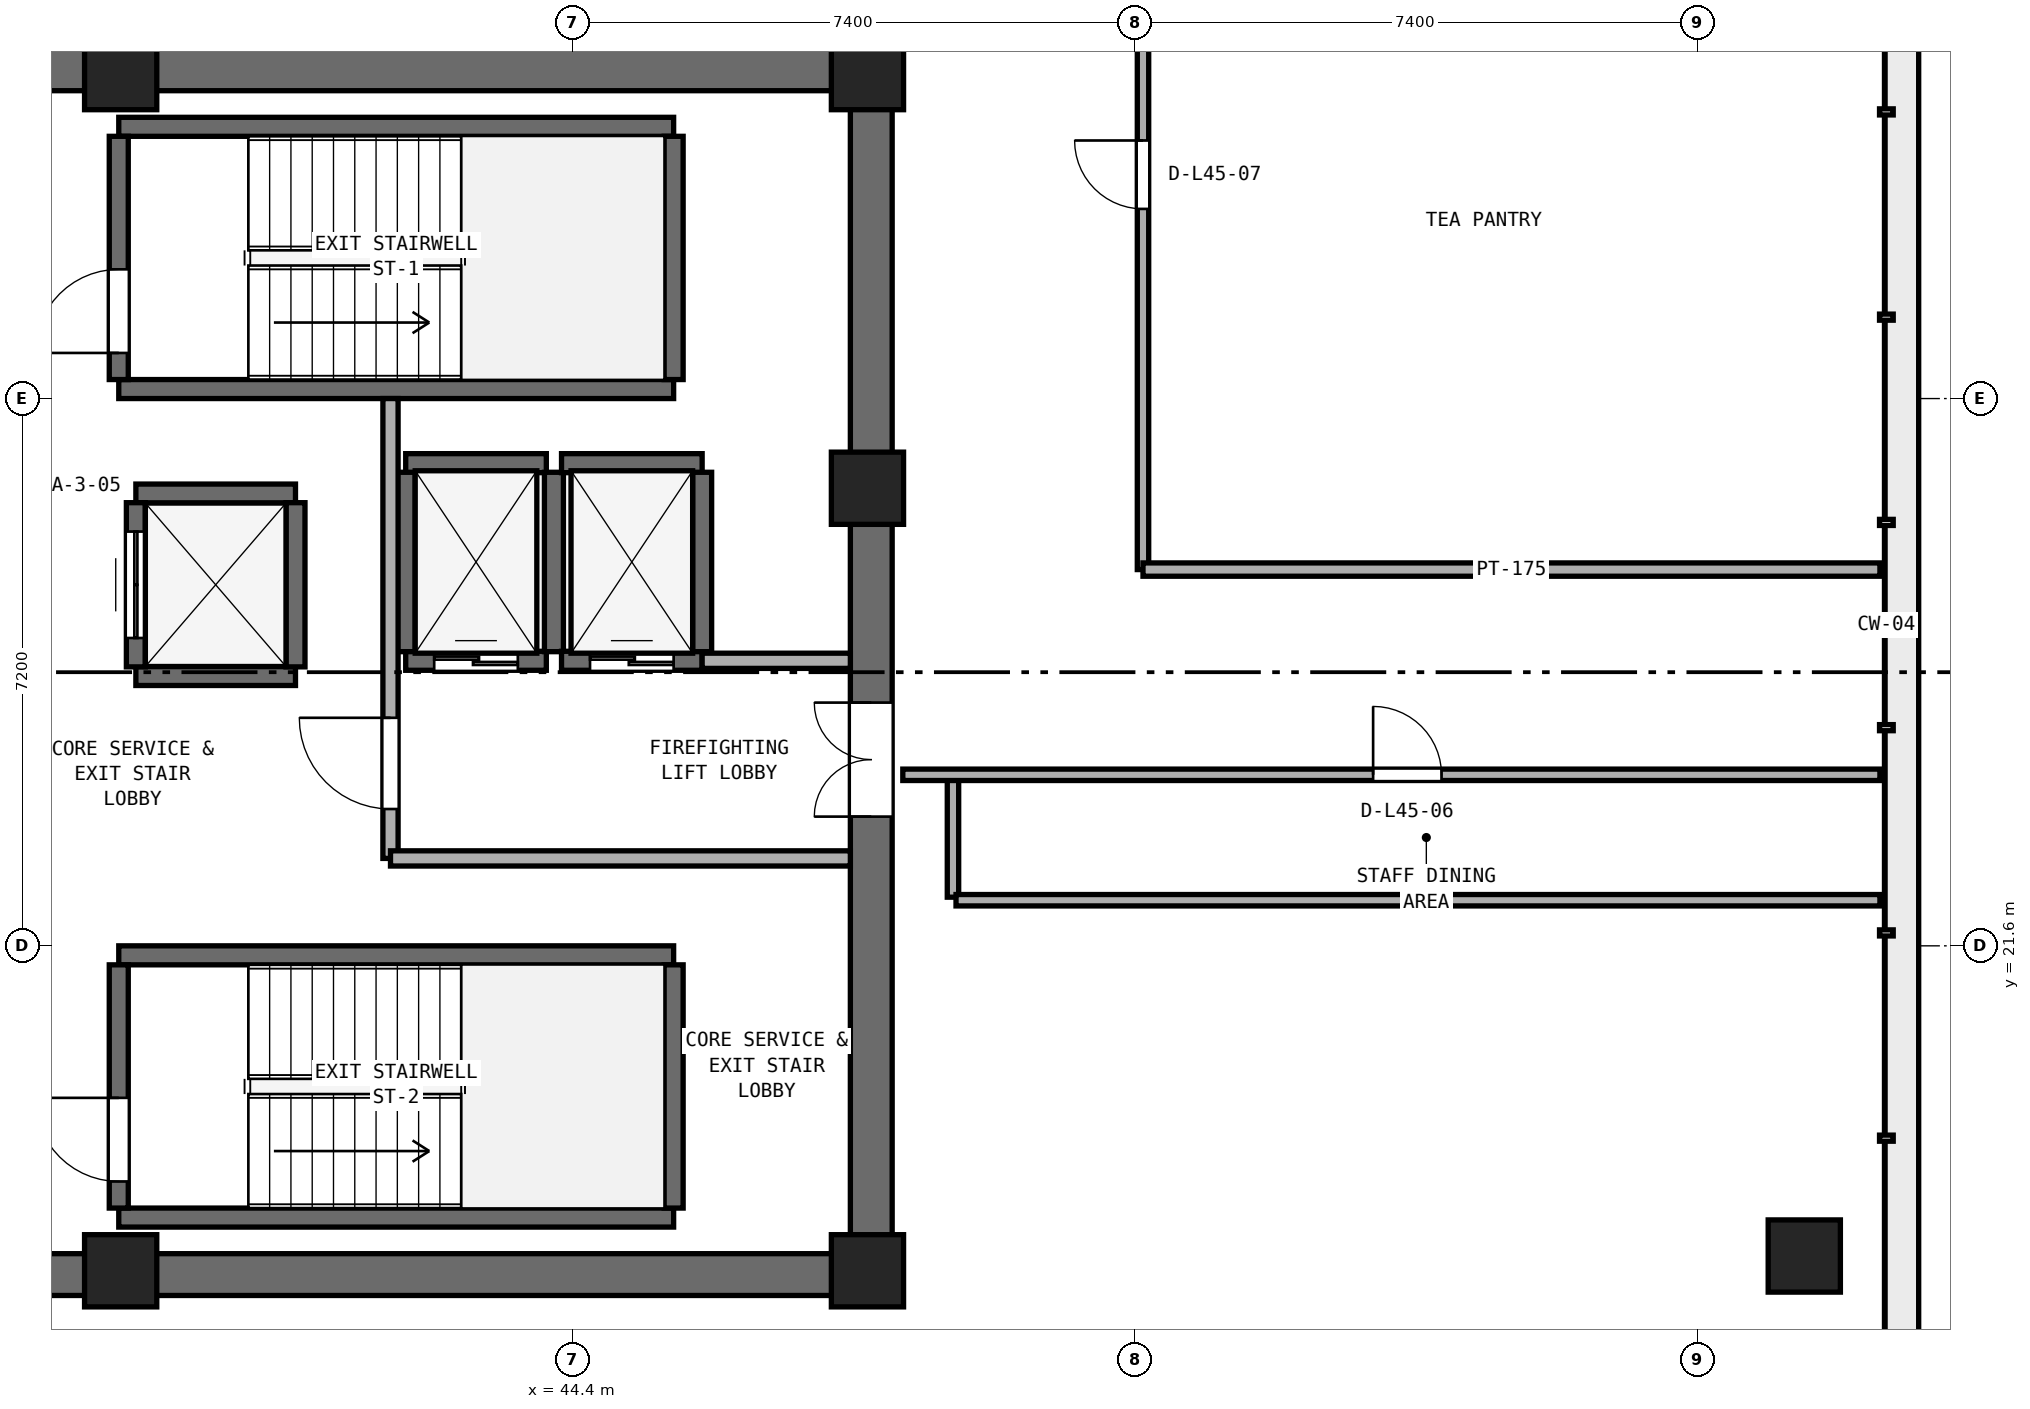
"""IFC4 building model, lengths in metres.
Left out: names, types, materials, properties, quantities, classifications, styles, units other than length and angle.
Written with IfcOpenShell. Run it as: python <this file> out.ifc"""

import sys

from ifc_helpers import new_model, si_unit, direction, frame, frame_2d, origin, origin_2d, place, context, subcontext, project, spatial, rectangle, extrude, element, fill, save


model = new_model("IFC4")
c1 = context("Model", 3, precision=1e-05, world=origin(), true_north=direction((0.0, 1.0)))
c2 = subcontext(c1, "Body", "Model", "MODEL_VIEW")
j1 = project(units=[si_unit("LENGTHUNIT", "METRE"), si_unit("PLANEANGLEUNIT", "RADIAN")], contexts=[c1])
p1 = place(None, origin())
s1 = spatial("IfcSite", under=j1, at=p1, CompositionType="ELEMENT")
p2 = place(p1, origin())
s2 = spatial("IfcBuilding", under=s1, at=p2, CompositionType="ELEMENT")
p3 = place(p2, frame((0.0, 0.0, 178.2)))
s3 = spatial("IfcBuildingStorey", under=s2, at=p3, CompositionType="ELEMENT", Elevation=178.2)
for number, where, z_axis, x_axis in (
    (1, (25.4, 17.275, 0.0), (0.0, 0.0, 1.0), (1.0, 0.0, 0.0)),
    (2, (25.4, 33.125, 0.0), (0.0, 0.0, 1.0), (1.0, 0.0, 0.0)),
):
    element("IfcWall", number, at=place(p3, frame(where, z_axis=z_axis, x_axis=x_axis)), inside=s3, PredefinedType="SHEAR", context=c2, shape_type="SweptSolid", body=[
        extrude(rectangle(XDim=23.2, YDim=0.55, at=frame_2d((11.6, 0.0))), origin(), (0.0, 0.0, 1.0), 3.54),
    ])
p4 = place(p3, frame((48.325, 17.55, 0.0), z_axis=(0.0, 0.0, 1.0), x_axis=(0.0, 1.0, 0.0)))
e3 = element("IfcWall", 3, at=p4, inside=s3, PredefinedType="SHEAR", context=c2, shape_type="SweptSolid", body=[
    extrude(rectangle(XDim=15.3, YDim=0.55, at=frame_2d((7.65, 0.0))), origin(), (0.0, 0.0, 1.0), 3.54),
])
p5 = place(p4, frame((5.75, 0.0, 0.0)))
e4 = element("IfcOpeningElement", 4, at=p5, cuts=e3, PredefinedType="OPENING", context=c2, shape_type="SweptSolid", body=[
    extrude(rectangle(XDim=1.5, YDim=2.15, at=frame_2d((0.75, 1.075))), frame((0.0, 0.285, 0.0), z_axis=(0.0, -1.0, 0.0), x_axis=(1.0, 0.0, 0.0)), (0.0, 0.0, 1.0), 0.57),
])
for number, where, z_axis, x_axis in (
    (5, (38.45, 17.325, 0.0), (0.0, 0.0, 1.0), (1.0, 0.0, 0.0)),
    (6, (48.275, 17.325, 0.0), (0.0, 0.0, 1.0), (1.0, 0.0, 0.0)),
    (7, (48.275, 27.62, 0.0), (0.0, 0.0, 1.0), (1.0, 0.0, 0.0)),
    (8, (48.275, 33.075, 0.0), (0.0, 0.0, 1.0), (1.0, 0.0, 0.0)),
    (9, (38.45, 33.075, 0.0), (0.0, 0.0, 1.0), (1.0, 0.0, 0.0)),
):
    element("IfcColumn", number, at=place(p3, frame(where, z_axis=z_axis, x_axis=x_axis)), inside=s3, PredefinedType="PILASTER", context=c2, shape_type="SweptSolid", body=[
        extrude(rectangle(XDim=0.95, YDim=0.95, at=origin_2d()), origin(), (0.0, 0.0, 1.0), 3.8),
    ])
p6 = place(p3, frame((60.6, 17.519, 0.0), z_axis=(0.0, 0.0, 1.0), x_axis=(1.0, 0.0, 0.0)))
e10 = element("IfcColumn", 10, at=p6, inside=s3, PredefinedType="COLUMN", context=c2, shape_type="SweptSolid", body=[
    extrude(rectangle(XDim=0.95, YDim=0.95, at=origin_2d()), origin(), (0.0, 0.0, 1.0), 3.8),
])
for number, where, z_axis, x_axis in (
    (11, (38.425, 28.925, 0.0), (0.0, 0.0, 1.0), (1.0, 0.0, 0.0)),
    (12, (38.425, 32.375, 0.0), (0.0, 0.0, 1.0), (1.0, 0.0, 0.0)),
):
    element("IfcWall", number, at=place(p3, frame(where, z_axis=z_axis, x_axis=x_axis)), inside=s3, PredefinedType="SHEAR", context=c2, shape_type="SweptSolid", body=[
        extrude(rectangle(XDim=7.3, YDim=0.25, at=frame_2d((3.65, 0.0))), origin(), (0.0, 0.0, 1.0), 3.54),
    ])
p7 = place(p3, frame((38.425, 29.05, 0.0), z_axis=(0.0, 0.0, 1.0), x_axis=(0.0, 1.0, 0.0)))
e13 = element("IfcWall", 13, at=p7, inside=s3, PredefinedType="SHEAR", context=c2, shape_type="SweptSolid", body=[
    extrude(rectangle(XDim=3.2, YDim=0.25, at=frame_2d((1.6, 0.0))), origin(), (0.0, 0.0, 1.0), 3.54),
])
p8 = place(p7, frame((0.35, 0.0, 0.0)))
e14 = element("IfcOpeningElement", 14, at=p8, cuts=e13, PredefinedType="OPENING", context=c2, shape_type="SweptSolid", body=[
    extrude(rectangle(XDim=1.1, YDim=2.15, at=frame_2d((0.55, 1.075))), frame((0.0, 0.135, 0.0), z_axis=(0.0, -1.0, 0.0), x_axis=(1.0, 0.0, 0.0)), (0.0, 0.0, 1.0), 0.27),
])
p9 = place(p3, frame((45.725, 29.05, 0.0), z_axis=(0.0, 0.0, 1.0), x_axis=(0.0, 1.0, 0.0)))
e15 = element("IfcWall", 15, at=p9, inside=s3, PredefinedType="SHEAR", context=c2, shape_type="SweptSolid", body=[
    extrude(rectangle(XDim=3.2, YDim=0.25, at=frame_2d((1.6, 0.0))), origin(), (0.0, 0.0, 1.0), 3.54),
])
for number, where, z_axis, x_axis in (
    (16, (38.425, 18.025, 0.0), (0.0, 0.0, 1.0), (1.0, 0.0, 0.0)),
    (17, (38.425, 21.475, 0.0), (0.0, 0.0, 1.0), (1.0, 0.0, 0.0)),
):
    element("IfcWall", number, at=place(p3, frame(where, z_axis=z_axis, x_axis=x_axis)), inside=s3, PredefinedType="SHEAR", context=c2, shape_type="SweptSolid", body=[
        extrude(rectangle(XDim=7.3, YDim=0.25, at=frame_2d((3.65, 0.0))), origin(), (0.0, 0.0, 1.0), 3.54),
    ])
p10 = place(p3, frame((38.425, 18.15, 0.0), z_axis=(0.0, 0.0, 1.0), x_axis=(0.0, 1.0, 0.0)))
e18 = element("IfcWall", 18, at=p10, inside=s3, PredefinedType="SHEAR", context=c2, shape_type="SweptSolid", body=[
    extrude(rectangle(XDim=3.2, YDim=0.25, at=frame_2d((1.6, 0.0))), origin(), (0.0, 0.0, 1.0), 3.54),
])
p11 = place(p10, frame((0.35, 0.0, 0.0)))
e19 = element("IfcOpeningElement", 19, at=p11, cuts=e18, PredefinedType="OPENING", context=c2, shape_type="SweptSolid", body=[
    extrude(rectangle(XDim=1.1, YDim=2.15, at=frame_2d((0.55, 1.075))), frame((0.0, 0.135, 0.0), z_axis=(0.0, -1.0, 0.0), x_axis=(1.0, 0.0, 0.0)), (0.0, 0.0, 1.0), 0.27),
])
p12 = place(p3, frame((45.725, 18.15, 0.0), z_axis=(0.0, 0.0, 1.0), x_axis=(0.0, 1.0, 0.0)))
e20 = element("IfcWall", 20, at=p12, inside=s3, PredefinedType="SHEAR", context=c2, shape_type="SweptSolid", body=[
    extrude(rectangle(XDim=3.2, YDim=0.25, at=frame_2d((1.6, 0.0))), origin(), (0.0, 0.0, 1.0), 3.54),
])
p13 = place(p3, frame((42.2, 25.35, 0.0), z_axis=(0.0, 0.0, 1.0), x_axis=(1.0, 0.0, 0.0)))
e21 = element("IfcWall", 21, at=p13, inside=s3, PredefinedType="SHEAR", context=c2, shape_type="SweptSolid", body=[
    extrude(rectangle(XDim=1.85, YDim=0.25, at=frame_2d((0.925, 0.0))), origin(), (0.0, 0.0, 1.0), 3.54),
])
p14 = place(p13, frame((0.375, 0.0, 0.0)))
e22 = element("IfcOpeningElement", 22, at=p14, cuts=e21, PredefinedType="OPENING", context=c2, shape_type="SweptSolid", body=[
    extrude(rectangle(XDim=1.1, YDim=2.15, at=frame_2d((0.55, 1.075))), frame((0.0, 0.135, 0.0), z_axis=(0.0, -1.0, 0.0), x_axis=(1.0, 0.0, 0.0)), (0.0, 0.0, 1.0), 0.27),
])
p15 = place(p3, frame((42.2, 27.95, 0.0), z_axis=(0.0, 0.0, 1.0), x_axis=(1.0, 0.0, 0.0)))
e23 = element("IfcWall", 23, at=p15, inside=s3, PredefinedType="SHEAR", context=c2, shape_type="SweptSolid", body=[
    extrude(rectangle(XDim=1.85, YDim=0.25, at=frame_2d((0.925, 0.0))), origin(), (0.0, 0.0, 1.0), 3.54),
])
for number, where, z_axis, x_axis in (
    (24, (42.2, 25.47, 0.0), (0.0, 0.0, 1.0), (0.0, 1.0, 0.0)),
    (25, (44.15, 25.47, 0.0), (0.0, 0.0, 1.0), (0.0, 1.0, 0.0)),
):
    element("IfcWall", number, at=place(p3, frame(where, z_axis=z_axis, x_axis=x_axis)), inside=s3, PredefinedType="SHEAR", context=c2, shape_type="SweptSolid", body=[
        extrude(rectangle(XDim=2.36, YDim=0.25, at=frame_2d((1.18, 0.0))), origin(), (0.0, 0.0, 1.0), 3.54),
    ])
p16 = place(p3, frame((44.25, 25.35, 0.0), z_axis=(0.0, 0.0, 1.0), x_axis=(1.0, 0.0, 0.0)))
e26 = element("IfcWall", 26, at=p16, inside=s3, PredefinedType="SHEAR", context=c2, shape_type="SweptSolid", body=[
    extrude(rectangle(XDim=1.85, YDim=0.25, at=frame_2d((0.925, 0.0))), origin(), (0.0, 0.0, 1.0), 3.54),
])
p17 = place(p16, frame((0.375, 0.0, 0.0)))
e27 = element("IfcOpeningElement", 27, at=p17, cuts=e26, PredefinedType="OPENING", context=c2, shape_type="SweptSolid", body=[
    extrude(rectangle(XDim=1.1, YDim=2.15, at=frame_2d((0.55, 1.075))), frame((0.0, 0.135, 0.0), z_axis=(0.0, -1.0, 0.0), x_axis=(1.0, 0.0, 0.0)), (0.0, 0.0, 1.0), 0.27),
])
p18 = place(p3, frame((44.25, 27.95, 0.0), z_axis=(0.0, 0.0, 1.0), x_axis=(1.0, 0.0, 0.0)))
e28 = element("IfcWall", 28, at=p18, inside=s3, PredefinedType="SHEAR", context=c2, shape_type="SweptSolid", body=[
    extrude(rectangle(XDim=1.85, YDim=0.25, at=frame_2d((0.925, 0.0))), origin(), (0.0, 0.0, 1.0), 3.54),
])
p19 = place(p3, frame((46.1, 25.47, 0.0), z_axis=(0.0, 0.0, 1.0), x_axis=(0.0, 1.0, 0.0)))
e29 = element("IfcWall", 29, at=p19, inside=s3, PredefinedType="SHEAR", context=c2, shape_type="SweptSolid", body=[
    extrude(rectangle(XDim=2.36, YDim=0.25, at=frame_2d((1.18, 0.0))), origin(), (0.0, 0.0, 1.0), 3.54),
])
for number, where, z_axis, x_axis in (
    (30, (38.65, 25.15, 0.0), (0.0, 0.0, 1.0), (1.0, 0.0, 0.0)),
    (31, (38.65, 27.55, 0.0), (0.0, 0.0, 1.0), (1.0, 0.0, 0.0)),
):
    element("IfcWall", number, at=place(p3, frame(where, z_axis=z_axis, x_axis=x_axis)), inside=s3, PredefinedType="SHEAR", context=c2, shape_type="SweptSolid", body=[
        extrude(rectangle(XDim=2.1, YDim=0.25, at=frame_2d((1.05, 0.0))), origin(), (0.0, 0.0, 1.0), 3.54),
    ])
p20 = place(p3, frame((38.65, 25.27, 0.0), z_axis=(0.0, 0.0, 1.0), x_axis=(0.0, 1.0, 0.0)))
e32 = element("IfcWall", 32, at=p20, inside=s3, PredefinedType="SHEAR", context=c2, shape_type="SweptSolid", body=[
    extrude(rectangle(XDim=2.16, YDim=0.25, at=frame_2d((1.08, 0.0))), origin(), (0.0, 0.0, 1.0), 3.54),
])
p21 = place(p20, frame((0.38, 0.0, 0.0)))
e33 = element("IfcOpeningElement", 33, at=p21, cuts=e32, PredefinedType="OPENING", context=c2, shape_type="SweptSolid", body=[
    extrude(rectangle(XDim=1.4, YDim=2.2, at=frame_2d((0.7, 1.1))), frame((0.0, 0.135, 0.0), z_axis=(0.0, -1.0, 0.0), x_axis=(1.0, 0.0, 0.0)), (0.0, 0.0, 1.0), 0.27),
])
p22 = place(p3, frame((40.75, 25.27, 0.0), z_axis=(0.0, 0.0, 1.0), x_axis=(0.0, 1.0, 0.0)))
e34 = element("IfcWall", 34, at=p22, inside=s3, PredefinedType="SHEAR", context=c2, shape_type="SweptSolid", body=[
    extrude(rectangle(XDim=2.16, YDim=0.25, at=frame_2d((1.08, 0.0))), origin(), (0.0, 0.0, 1.0), 3.54),
])
p23 = place(p3, frame((42.0, 22.75, 0.0), z_axis=(0.0, 0.0, 1.0), x_axis=(0.0, 1.0, 0.0)))
e35 = element("IfcWall", 35, at=p23, inside=s3, PredefinedType="SOLIDWALL", context=c2, shape_type="SweptSolid", body=[
    extrude(rectangle(XDim=6.05, YDim=0.2, at=frame_2d((3.025, 0.0))), origin(), (0.0, 0.0, 1.0), 3.54),
])
p24 = place(p23, frame((0.65, 0.0, 0.0)))
e36 = element("IfcOpeningElement", 36, at=p24, cuts=e35, PredefinedType="OPENING", context=c2, shape_type="SweptSolid", body=[
    extrude(rectangle(XDim=1.2, YDim=2.15, at=frame_2d((0.6, 1.075))), frame((0.0, 0.11, 0.0), z_axis=(0.0, -1.0, 0.0), x_axis=(1.0, 0.0, 0.0)), (0.0, 0.0, 1.0), 0.22),
])
p25 = place(p3, frame((42.0, 22.75, 0.0), z_axis=(0.0, 0.0, 1.0), x_axis=(1.0, 0.0, 0.0)))
e37 = element("IfcWall", 37, at=p25, inside=s3, PredefinedType="SOLIDWALL", context=c2, shape_type="SweptSolid", body=[
    extrude(rectangle(XDim=6.05, YDim=0.2, at=frame_2d((3.025, 0.0))), origin(), (0.0, 0.0, 1.0), 3.54),
])
p26 = place(p3, frame((46.1, 25.35, 0.0), z_axis=(0.0, 0.0, 1.0), x_axis=(1.0, 0.0, 0.0)))
e38 = element("IfcWall", 38, at=p26, inside=s3, PredefinedType="SOLIDWALL", context=c2, shape_type="SweptSolid", body=[
    extrude(rectangle(XDim=1.95, YDim=0.2, at=frame_2d((0.975, 0.0))), origin(), (0.0, 0.0, 1.0), 3.54),
])
p27 = place(p3, frame((51.9, 26.55, 0.0), z_axis=(0.0, 0.0, 1.0), x_axis=(0.0, 1.0, 0.0)))
e39 = element("IfcWall", 39, at=p27, inside=s3, PredefinedType="PARTITIONING", context=c2, shape_type="SweptSolid", body=[
    extrude(rectangle(XDim=17.898, YDim=0.15, at=frame_2d((8.949, 0.0))), origin(), (0.0, 0.0, 1.0), 3.54),
])
p28 = place(p27, frame((4.745, 0.0, 0.0)))
e40 = element("IfcOpeningElement", 40, at=p28, cuts=e39, PredefinedType="OPENING", context=c2, shape_type="SweptSolid", body=[
    extrude(rectangle(XDim=0.9, YDim=2.1, at=frame_2d((0.45, 1.05))), frame((0.0, 0.085, 0.0), z_axis=(0.0, -1.0, 0.0), x_axis=(1.0, 0.0, 0.0)), (0.0, 0.0, 1.0), 0.17),
])
p29 = place(p3, frame((49.4, 22.24, 0.0), z_axis=(0.0, 0.0, 1.0), x_axis=(0.0, 1.0, 0.0)))
e41 = element("IfcWall", 41, at=p29, inside=s3, PredefinedType="PARTITIONING", context=c2, shape_type="SweptSolid", body=[
    extrude(rectangle(XDim=1.609, YDim=0.15, at=frame_2d((0.805, 0.0))), origin(), (0.0, 0.0, 1.0), 3.54),
])
p30 = place(p3, frame((49.44, 22.2, 0.0), z_axis=(0.0, 0.0, 1.0), x_axis=(1.0, 0.0, 0.0)))
e42 = element("IfcWall", 42, at=p30, inside=s3, PredefinedType="PARTITIONING", context=c2, shape_type="SweptSolid", body=[
    extrude(rectangle(XDim=12.155, YDim=0.15, at=frame_2d((6.078, 0.0))), origin(), (0.0, 0.0, 1.0), 3.54),
])
p31 = place(p3, frame((48.74, 23.85, 0.0), z_axis=(0.0, 0.0, 1.0), x_axis=(1.0, 0.0, 0.0)))
e43 = element("IfcWall", 43, at=p31, inside=s3, PredefinedType="PARTITIONING", context=c2, shape_type="SweptSolid", body=[
    extrude(rectangle(XDim=12.855, YDim=0.15, at=frame_2d((6.427, 0.0))), origin(), (0.0, 0.0, 1.0), 3.54),
])
p32 = place(p31, frame((6.188, 0.0, 0.0)))
e44 = element("IfcOpeningElement", 44, at=p32, cuts=e43, PredefinedType="OPENING", context=c2, shape_type="SweptSolid", body=[
    extrude(rectangle(XDim=0.9, YDim=2.1, at=frame_2d((0.45, 1.05))), frame((0.0, 0.085, 0.0), z_axis=(0.0, -1.0, 0.0), x_axis=(1.0, 0.0, 0.0)), (0.0, 0.0, 1.0), 0.17),
])
p33 = place(p3, frame((51.9, 26.55, 0.0), z_axis=(0.0, 0.0, 1.0), x_axis=(1.0, 0.0, 0.0)))
e45 = element("IfcWall", 45, at=p33, inside=s3, PredefinedType="PARTITIONING", context=c2, shape_type="SweptSolid", body=[
    extrude(rectangle(XDim=9.695, YDim=0.175, at=frame_2d((4.848, 0.0))), origin(), (0.0, 0.0, 1.0), 3.54),
])
p34 = place(p8, origin())
e46 = element("IfcDoor", 46, at=p34, inside=s3, OperationType="SINGLE_SWING_LEFT", PredefinedType="DOOR", context=c2, shape_type="SweptSolid", body=[
    extrude(rectangle(XDim=1.1, YDim=2.15, at=frame_2d((0.55, 1.075))), frame((0.0, 0.025, 0.0), z_axis=(0.0, -1.0, 0.0), x_axis=(1.0, 0.0, 0.0)), (0.0, 0.0, 1.0), 0.05),
])
fill(e14, e46)
p35 = place(p11, origin())
e47 = element("IfcDoor", 47, at=p35, inside=s3, OperationType="SINGLE_SWING_RIGHT", PredefinedType="DOOR", context=c2, shape_type="SweptSolid", body=[
    extrude(rectangle(XDim=1.1, YDim=2.15, at=frame_2d((0.55, 1.075))), frame((0.0, 0.025, 0.0), z_axis=(0.0, -1.0, 0.0), x_axis=(1.0, 0.0, 0.0)), (0.0, 0.0, 1.0), 0.05),
])
fill(e19, e47)
p36 = place(p14, origin())
e48 = element("IfcDoor", 48, at=p36, inside=s3, OperationType="DOUBLE_DOOR_SLIDING", PredefinedType="DOOR", context=c2, shape_type="SweptSolid", body=[
    extrude(rectangle(XDim=1.1, YDim=2.15, at=frame_2d((0.55, 1.075))), frame((0.0, 0.025, 0.0), z_axis=(0.0, -1.0, 0.0), x_axis=(1.0, 0.0, 0.0)), (0.0, 0.0, 1.0), 0.05),
])
fill(e22, e48)
p37 = place(p17, origin())
e49 = element("IfcDoor", 49, at=p37, inside=s3, OperationType="DOUBLE_DOOR_SLIDING", PredefinedType="DOOR", context=c2, shape_type="SweptSolid", body=[
    extrude(rectangle(XDim=1.1, YDim=2.15, at=frame_2d((0.55, 1.075))), frame((0.0, 0.025, 0.0), z_axis=(0.0, -1.0, 0.0), x_axis=(1.0, 0.0, 0.0)), (0.0, 0.0, 1.0), 0.05),
])
fill(e27, e49)
p38 = place(p21, origin())
e50 = element("IfcDoor", 50, at=p38, inside=s3, OperationType="DOUBLE_DOOR_SLIDING", PredefinedType="DOOR", context=c2, shape_type="SweptSolid", body=[
    extrude(rectangle(XDim=1.4, YDim=2.2, at=frame_2d((0.7, 1.1))), frame((0.0, 0.025, 0.0), z_axis=(0.0, -1.0, 0.0), x_axis=(1.0, 0.0, 0.0)), (0.0, 0.0, 1.0), 0.05),
])
fill(e33, e50)
p39 = place(p24, origin())
e51 = element("IfcDoor", 51, at=p39, inside=s3, OperationType="SINGLE_SWING_RIGHT", PredefinedType="DOOR", context=c2, shape_type="SweptSolid", body=[
    extrude(rectangle(XDim=1.2, YDim=2.15, at=frame_2d((0.6, 1.075))), frame((0.0, 0.025, 0.0), z_axis=(0.0, -1.0, 0.0), x_axis=(1.0, 0.0, 0.0)), (0.0, 0.0, 1.0), 0.05),
])
fill(e36, e51)
p40 = place(p5, origin())
e52 = element("IfcDoor", 52, at=p40, inside=s3, OperationType="DOUBLE_DOOR_SINGLE_SWING", PredefinedType="DOOR", context=c2, shape_type="SweptSolid", body=[
    extrude(rectangle(XDim=1.5, YDim=2.15, at=frame_2d((0.75, 1.075))), frame((0.0, 0.025, 0.0), z_axis=(0.0, -1.0, 0.0), x_axis=(1.0, 0.0, 0.0)), (0.0, 0.0, 1.0), 0.05),
])
fill(e4, e52)
p41 = place(p32, origin())
e53 = element("IfcDoor", 53, at=p41, inside=s3, OperationType="SINGLE_SWING_LEFT", PredefinedType="DOOR", context=c2, shape_type="SweptSolid", body=[
    extrude(rectangle(XDim=0.9, YDim=2.1, at=frame_2d((0.45, 1.05))), frame((0.0, 0.025, 0.0), z_axis=(0.0, -1.0, 0.0), x_axis=(1.0, 0.0, 0.0)), (0.0, 0.0, 1.0), 0.05),
])
fill(e44, e53)
p42 = place(p28, origin())
e54 = element("IfcDoor", 54, at=p42, inside=s3, OperationType="SINGLE_SWING_RIGHT", PredefinedType="DOOR", context=c2, shape_type="SweptSolid", body=[
    extrude(rectangle(XDim=0.9, YDim=2.1, at=frame_2d((0.45, 1.05))), frame((0.0, 0.025, 0.0), z_axis=(0.0, -1.0, 0.0), x_axis=(1.0, 0.0, 0.0)), (0.0, 0.0, 1.0), 0.05),
])
fill(e40, e54)
save(model, sys.argv[1])
